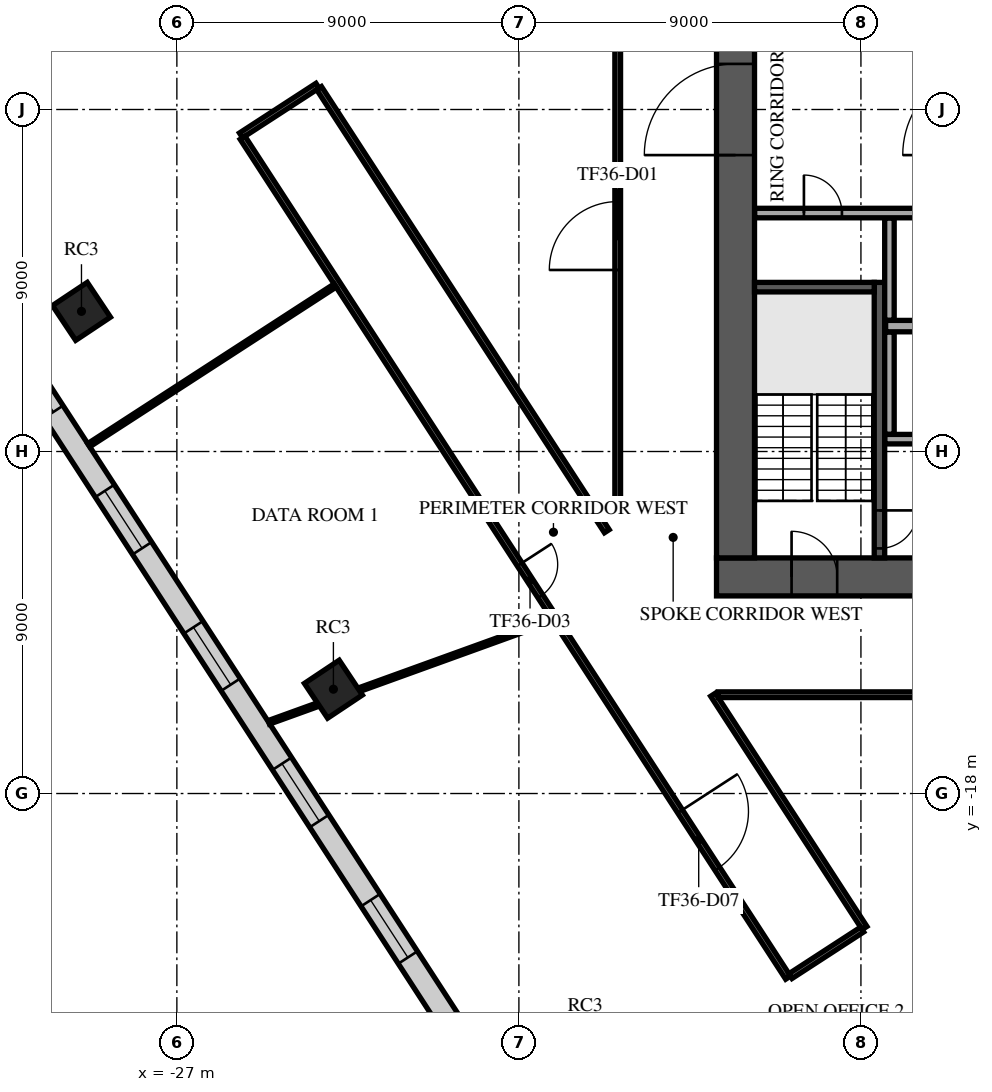
"""IFC4 building model, lengths in metres.
Left out: names, types, materials, properties, quantities, classifications, styles, units other than length and angle.
Written with IfcOpenShell. Run it as: python <this file> out.ifc"""

import sys

from ifc_helpers import new_model, si_unit, direction, frame, frame_2d, origin, origin_2d, place, context, subcontext, project, spatial, rectangle, extrude, element, fill, save


model = new_model("IFC4")
c1 = context("Model", 3, precision=1e-05, world=origin(), true_north=direction((0.0, 1.0)))
c2 = subcontext(c1, "Body", "Model", "MODEL_VIEW")
j1 = project(units=[si_unit("LENGTHUNIT", "METRE"), si_unit("PLANEANGLEUNIT", "RADIAN")], contexts=[c1])
p1 = place(None, origin())
s1 = spatial("IfcSite", under=j1, at=p1, CompositionType="ELEMENT")
p2 = place(p1, origin())
s2 = spatial("IfcBuilding", under=s1, at=p2, CompositionType="ELEMENT")
p3 = place(p2, frame((0.0, 0.0, 155.7)))
s3 = spatial("IfcBuildingStorey", under=s2, at=p3, CompositionType="ELEMENT", Elevation=155.7)
for number, where, z_axis, x_axis in (
    (1, (-29.51, -5.312, 0.0), (0.0, 0.0, 1.0), (0.832, 0.555, 0.0)),
    (2, (-22.881, -15.255, 0.0), (0.0, 0.0, 1.0), (0.832, 0.555, 0.0)),
):
    element("IfcColumn", number, at=place(p3, frame(where, z_axis=z_axis, x_axis=x_axis)), inside=s3, PredefinedType="COLUMN", context=c2, shape_type="SweptSolid", body=[
        extrude(rectangle(XDim=1.1, YDim=1.1, at=origin_2d()), origin(), (0.0, 0.0, 1.0), 4.0),
    ])
p4 = place(p3, frame((-12.8, -12.3, 0.0), z_axis=(0.0, 0.0, 1.0), x_axis=(1.0, 0.0, 0.0)))
e3 = element("IfcWall", 3, at=p4, inside=s3, PredefinedType="SHEAR", context=c2, shape_type="SweptSolid", body=[
    extrude(rectangle(XDim=25.6, YDim=1.0, at=frame_2d((12.8, 0.0))), origin(), (0.0, 0.0, 1.0), 3.6),
])
p5 = place(p4, frame((7.7, 0.0, 0.0)))
e4 = element("IfcOpeningElement", 4, at=p5, cuts=e3, PredefinedType="OPENING", context=c2, shape_type="SweptSolid", body=[
    extrude(rectangle(XDim=2.0, YDim=2.1, at=frame_2d((1.0, 1.05))), frame((0.0, 0.51, 0.0), z_axis=(0.0, -1.0, 0.0), x_axis=(1.0, 0.0, 0.0)), (0.0, 0.0, 1.0), 1.02),
])
p6 = place(p4, frame((17.825, 0.0, 0.0)))
e5 = element("IfcOpeningElement", 5, at=p6, cuts=e3, PredefinedType="OPENING", context=c2, shape_type="SweptSolid", body=[
    extrude(rectangle(XDim=1.2, YDim=2.1, at=frame_2d((0.6, 1.05))), frame((0.0, 0.51, 0.0), z_axis=(0.0, -1.0, 0.0), x_axis=(1.0, 0.0, 0.0)), (0.0, 0.0, 1.0), 1.02),
])
p7 = place(p4, frame((1.975, 0.0, 0.0)))
e6 = element("IfcOpeningElement", 6, at=p7, cuts=e3, PredefinedType="OPENING", context=c2, shape_type="SweptSolid", body=[
    extrude(rectangle(XDim=1.2, YDim=2.1, at=frame_2d((0.6, 1.05))), frame((0.0, 0.51, 0.0), z_axis=(0.0, -1.0, 0.0), x_axis=(1.0, 0.0, 0.0)), (0.0, 0.0, 1.0), 1.02),
])
p8 = place(p4, frame((22.425, 0.0, 0.0)))
e7 = element("IfcOpeningElement", 7, at=p8, cuts=e3, PredefinedType="OPENING", context=c2, shape_type="SweptSolid", body=[
    extrude(rectangle(XDim=1.2, YDim=2.1, at=frame_2d((0.6, 1.05))), frame((0.0, 0.51, 0.0), z_axis=(0.0, -1.0, 0.0), x_axis=(1.0, 0.0, 0.0)), (0.0, 0.0, 1.0), 1.02),
])
p9 = place(p3, frame((-12.3, -11.8, 0.0), z_axis=(0.0, 0.0, 1.0), x_axis=(0.0, 1.0, 0.0)))
e8 = element("IfcWall", 8, at=p9, inside=s3, PredefinedType="SHEAR", context=c2, shape_type="SweptSolid", body=[
    extrude(rectangle(XDim=23.6, YDim=1.0, at=frame_2d((11.8, 0.0))), origin(), (0.0, 0.0, 1.0), 3.6),
])
p10 = place(p9, frame((10.6, 0.0, 0.0)))
e9 = element("IfcOpeningElement", 9, at=p10, cuts=e8, PredefinedType="OPENING", context=c2, shape_type="SweptSolid", body=[
    extrude(rectangle(XDim=2.4, YDim=2.4, at=frame_2d((1.2, 1.2))), frame((0.0, 0.51, 0.0), z_axis=(0.0, -1.0, 0.0), x_axis=(1.0, 0.0, 0.0)), (0.0, 0.0, 1.0), 1.02),
])
p11 = place(p3, frame((-8.512, -4.55, 0.0), z_axis=(0.0, 0.0, 1.0), x_axis=(0.0, -1.0, 0.0)))
e10 = element("IfcWall", 10, at=p11, inside=s3, PredefinedType="SOLIDWALL", context=c2, shape_type="SweptSolid", body=[
    extrude(rectangle(XDim=7.25, YDim=0.275, at=frame_2d((3.625, 0.0))), origin(), (0.0, 0.0, 1.0), 3.6),
])
p12 = place(p11, frame((6.0, 0.0, 0.0)))
e11 = element("IfcOpeningElement", 11, at=p12, cuts=e10, PredefinedType="OPENING", context=c2, shape_type="SweptSolid", body=[
    extrude(rectangle(XDim=1.0, YDim=2.1, at=frame_2d((0.5, 1.05))), frame((0.0, 0.147, 0.0), z_axis=(0.0, -1.0, 0.0), x_axis=(1.0, 0.0, 0.0)), (0.0, 0.0, 1.0), 0.295),
])
p13 = place(p3, frame((-8.65, -4.675, 0.0), z_axis=(0.0, 0.0, 1.0), x_axis=(-1.0, 0.0, 0.0)))
e12 = element("IfcWall", 12, at=p13, inside=s3, PredefinedType="SOLIDWALL", context=c2, shape_type="SweptSolid", body=[
    extrude(rectangle(XDim=3.15, YDim=0.25, at=frame_2d((1.575, 0.0))), origin(), (0.0, 0.0, 1.0), 3.6),
])
p14 = place(p3, frame((-8.37, -8.675, 0.0), z_axis=(0.0, 0.0, 1.0), x_axis=(1.0, 0.0, 0.0)))
e13 = element("IfcWall", 13, at=p14, inside=s3, PredefinedType="PARTITIONING", context=c2, shape_type="SweptSolid", body=[
    extrude(rectangle(XDim=5.49, YDim=0.25, at=frame_2d((2.745, 0.0))), origin(), (0.0, 0.0, 1.0), 3.6),
])
p15 = place(p14, frame((0.995, 0.0, 0.0)))
e14 = element("IfcOpeningElement", 14, at=p15, cuts=e13, PredefinedType="OPENING", context=c2, shape_type="SweptSolid", body=[
    extrude(rectangle(XDim=1.0, YDim=2.1, at=frame_2d((0.5, 1.05))), frame((0.0, 0.135, 0.0), z_axis=(0.0, -1.0, 0.0), x_axis=(1.0, 0.0, 0.0)), (0.0, 0.0, 1.0), 0.27),
])
p16 = place(p14, frame((3.745, 0.0, 0.0)))
e15 = element("IfcOpeningElement", 15, at=p16, cuts=e13, PredefinedType="OPENING", context=c2, shape_type="SweptSolid", body=[
    extrude(rectangle(XDim=1.0, YDim=2.1, at=frame_2d((0.5, 1.05))), frame((0.0, 0.135, 0.0), z_axis=(0.0, -1.0, 0.0), x_axis=(1.0, 0.0, 0.0)), (0.0, 0.0, 1.0), 0.27),
])
p17 = place(p3, frame((-8.25, -8.545, 0.0), z_axis=(0.0, 0.0, 1.0), x_axis=(0.0, 1.0, 0.0)))
e16 = element("IfcWall", 16, at=p17, inside=s3, PredefinedType="PARTITIONING", context=c2, shape_type="SweptSolid", body=[
    extrude(rectangle(XDim=2.69, YDim=0.25, at=frame_2d((1.345, 0.0))), origin(), (0.0, 0.0, 1.0), 3.6),
])
p18 = place(p3, frame((-8.35, -5.7, 0.0), z_axis=(0.0, 0.0, 1.0), x_axis=(1.0, 0.0, 0.0)))
e17 = element("IfcWall", 17, at=p18, inside=s3, PredefinedType="PARTITIONING", context=c2, shape_type="SweptSolid", body=[
    extrude(rectangle(XDim=5.47, YDim=0.3, at=frame_2d((2.735, 0.0))), origin(), (0.0, 0.0, 1.0), 3.6),
])
p19 = place(p3, frame((-8.25, -5.545, 0.0), z_axis=(0.0, 0.0, 1.0), x_axis=(0.0, 1.0, 0.0)))
e18 = element("IfcWall", 18, at=p19, inside=s3, PredefinedType="PARTITIONING", context=c2, shape_type="SweptSolid", body=[
    extrude(rectangle(XDim=2.69, YDim=0.25, at=frame_2d((1.345, 0.0))), origin(), (0.0, 0.0, 1.0), 3.6),
])
p20 = place(p3, frame((-11.795, -2.725, 0.0), z_axis=(0.0, 0.0, 1.0), x_axis=(1.0, 0.0, 0.0)))
e19 = element("IfcWall", 19, at=p20, inside=s3, PredefinedType="PARTITIONING", context=c2, shape_type="SweptSolid", body=[
    extrude(rectangle(XDim=8.915, YDim=0.25, at=frame_2d((4.458, 0.0))), origin(), (0.0, 0.0, 1.0), 3.6),
])
p21 = place(p20, frame((1.295, 0.0, 0.0)))
e20 = element("IfcOpeningElement", 20, at=p21, cuts=e19, PredefinedType="OPENING", context=c2, shape_type="SweptSolid", body=[
    extrude(rectangle(XDim=1.0, YDim=2.1, at=frame_2d((0.5, 1.05))), frame((0.0, 0.135, 0.0), z_axis=(0.0, -1.0, 0.0), x_axis=(1.0, 0.0, 0.0)), (0.0, 0.0, 1.0), 0.27),
])
p22 = place(p20, frame((4.42, 0.0, 0.0)))
e21 = element("IfcOpeningElement", 21, at=p22, cuts=e19, PredefinedType="OPENING", context=c2, shape_type="SweptSolid", body=[
    extrude(rectangle(XDim=1.0, YDim=2.1, at=frame_2d((0.5, 1.05))), frame((0.0, 0.135, 0.0), z_axis=(0.0, -1.0, 0.0), x_axis=(1.0, 0.0, 0.0)), (0.0, 0.0, 1.0), 0.27),
])
p23 = place(p3, frame((-36.496, 1.667, 0.0), z_axis=(0.0, 0.0, 1.0), x_axis=(0.544642236407, -0.838668488929, 0.0)))
e22 = element("IfcWall", 22, at=p23, inside=s3, PredefinedType="STANDARD", context=c2, shape_type="SweptSolid", body=[
    extrude(rectangle(XDim=42.552, YDim=0.6, at=frame_2d((21.276, 0.0))), origin(), (0.0, 0.0, 1.0), 3.6),
])
p24 = place(p23, frame((1.178, 0.0, 0.9)))
e23 = element("IfcOpeningElement", 23, at=p24, cuts=e22, PredefinedType="OPENING", context=c2, shape_type="SweptSolid", body=[
    extrude(rectangle(XDim=1.8, YDim=2.1, at=frame_2d((0.9, 1.05))), frame((0.0, 0.31, 0.0), z_axis=(0.0, -1.0, 0.0), x_axis=(1.0, 0.0, 0.0)), (0.0, 0.0, 1.0), 0.62),
])
p25 = place(p23, frame((5.396, 0.0, 0.9)))
e24 = element("IfcOpeningElement", 24, at=p25, cuts=e22, PredefinedType="OPENING", context=c2, shape_type="SweptSolid", body=[
    extrude(rectangle(XDim=1.8, YDim=2.1, at=frame_2d((0.9, 1.05))), frame((0.0, 0.31, 0.0), z_axis=(0.0, -1.0, 0.0), x_axis=(1.0, 0.0, 0.0)), (0.0, 0.0, 1.0), 0.62),
])
p26 = place(p23, frame((9.676, 0.0, 0.9)))
e25 = element("IfcOpeningElement", 25, at=p26, cuts=e22, PredefinedType="OPENING", context=c2, shape_type="SweptSolid", body=[
    extrude(rectangle(XDim=1.8, YDim=2.1, at=frame_2d((0.9, 1.05))), frame((0.0, 0.31, 0.0), z_axis=(0.0, -1.0, 0.0), x_axis=(1.0, 0.0, 0.0)), (0.0, 0.0, 1.0), 0.62),
])
p27 = place(p23, frame((13.956, 0.0, 0.9)))
e26 = element("IfcOpeningElement", 26, at=p27, cuts=e22, PredefinedType="OPENING", context=c2, shape_type="SweptSolid", body=[
    extrude(rectangle(XDim=1.8, YDim=2.1, at=frame_2d((0.9, 1.05))), frame((0.0, 0.31, 0.0), z_axis=(0.0, -1.0, 0.0), x_axis=(1.0, 0.0, 0.0)), (0.0, 0.0, 1.0), 0.62),
])
p28 = place(p23, frame((18.236, 0.0, 0.9)))
e27 = element("IfcOpeningElement", 27, at=p28, cuts=e22, PredefinedType="OPENING", context=c2, shape_type="SweptSolid", body=[
    extrude(rectangle(XDim=1.8, YDim=2.1, at=frame_2d((0.9, 1.05))), frame((0.0, 0.31, 0.0), z_axis=(0.0, -1.0, 0.0), x_axis=(1.0, 0.0, 0.0)), (0.0, 0.0, 1.0), 0.62),
])
p29 = place(p23, frame((22.516, 0.0, 0.9)))
e28 = element("IfcOpeningElement", 28, at=p29, cuts=e22, PredefinedType="OPENING", context=c2, shape_type="SweptSolid", body=[
    extrude(rectangle(XDim=1.8, YDim=2.1, at=frame_2d((0.9, 1.05))), frame((0.0, 0.31, 0.0), z_axis=(0.0, -1.0, 0.0), x_axis=(1.0, 0.0, 0.0)), (0.0, 0.0, 1.0), 0.62),
])
p30 = place(p23, frame((26.796, 0.0, 0.9)))
e29 = element("IfcOpeningElement", 29, at=p30, cuts=e22, PredefinedType="OPENING", context=c2, shape_type="SweptSolid", body=[
    extrude(rectangle(XDim=1.8, YDim=2.1, at=frame_2d((0.9, 1.05))), frame((0.0, 0.31, 0.0), z_axis=(0.0, -1.0, 0.0), x_axis=(1.0, 0.0, 0.0)), (0.0, 0.0, 1.0), 0.62),
])
p31 = place(p23, frame((31.076, 0.0, 0.9)))
e30 = element("IfcOpeningElement", 30, at=p31, cuts=e22, PredefinedType="OPENING", context=c2, shape_type="SweptSolid", body=[
    extrude(rectangle(XDim=1.8, YDim=2.1, at=frame_2d((0.9, 1.05))), frame((0.0, 0.31, 0.0), z_axis=(0.0, -1.0, 0.0), x_axis=(1.0, 0.0, 0.0)), (0.0, 0.0, 1.0), 0.62),
])
p32 = place(p23, frame((35.356, 0.0, 0.9)))
e31 = element("IfcOpeningElement", 31, at=p32, cuts=e22, PredefinedType="OPENING", context=c2, shape_type="SweptSolid", body=[
    extrude(rectangle(XDim=1.8, YDim=2.1, at=frame_2d((0.9, 1.05))), frame((0.0, 0.31, 0.0), z_axis=(0.0, -1.0, 0.0), x_axis=(1.0, 0.0, 0.0)), (0.0, 0.0, 1.0), 0.62),
])
p33 = place(p23, frame((39.573, 0.0, 0.9)))
e32 = element("IfcOpeningElement", 32, at=p33, cuts=e22, PredefinedType="OPENING", context=c2, shape_type="SweptSolid", body=[
    extrude(rectangle(XDim=1.8, YDim=2.1, at=frame_2d((0.9, 1.05))), frame((0.0, 0.31, 0.0), z_axis=(0.0, -1.0, 0.0), x_axis=(1.0, 0.0, 0.0)), (0.0, 0.0, 1.0), 0.62),
])
p34 = place(p3, frame((-25.312, -0.681, 0.0), z_axis=(0.0, 0.0, 1.0), x_axis=(0.838734016275, 0.544541320694, 0.0)))
e33 = element("IfcWall", 33, at=p34, inside=s3, PredefinedType="PARTITIONING", context=c2, shape_type="SweptSolid", body=[
    extrude(rectangle(XDim=2.4, YDim=0.15, at=frame_2d((1.2, 0.0))), origin(), (0.0, 0.0, 1.0), 3.15),
])
p35 = place(p3, frame((-25.271, -0.744, 0.0), z_axis=(0.0, 0.0, 1.0), x_axis=(0.544659433471, -0.838657320681, 0.0)))
e34 = element("IfcWall", 34, at=p35, inside=s3, PredefinedType="PARTITIONING", context=c2, shape_type="SweptSolid", body=[
    extrude(rectangle(XDim=26.354, YDim=0.15, at=frame_2d((13.177, 0.0))), origin(), (0.0, 0.0, 1.0), 3.15),
])
p36 = place(p35, frame((13.388, 0.0, 0.0)))
e35 = element("IfcOpeningElement", 35, at=p36, cuts=e34, PredefinedType="OPENING", context=c2, shape_type="SweptSolid", body=[
    extrude(rectangle(XDim=1.0, YDim=2.1, at=frame_2d((0.5, 1.05))), frame((0.0, 0.085, 0.0), z_axis=(0.0, -1.0, 0.0), x_axis=(1.0, 0.0, 0.0)), (0.0, 0.0, 1.0), 0.17),
])
p37 = place(p35, frame((21.137, 0.0, 0.0)))
e36 = element("IfcOpeningElement", 36, at=p37, cuts=e34, PredefinedType="OPENING", context=c2, shape_type="SweptSolid", body=[
    extrude(rectangle(XDim=1.8, YDim=2.1, at=frame_2d((0.9, 1.05))), frame((0.0, 0.085, 0.0), z_axis=(0.0, -1.0, 0.0), x_axis=(1.0, 0.0, 0.0)), (0.0, 0.0, 1.0), 0.17),
])
p38 = place(p3, frame((-23.258, 0.563, 0.0), z_axis=(0.0, 0.0, 1.0), x_axis=(0.544638327972, -0.838671027104, 0.0)))
e37 = element("IfcWall", 37, at=p38, inside=s3, PredefinedType="PARTITIONING", context=c2, shape_type="SweptSolid", body=[
    extrude(rectangle(XDim=13.903, YDim=0.15, at=frame_2d((6.951, 0.0))), origin(), (0.0, 0.0, 1.0), 3.15),
])
p39 = place(p3, frame((-15.4, -10.773, 0.0), z_axis=(0.0, 0.0, 1.0), x_axis=(0.0, 1.0, 0.0)))
e38 = element("IfcWall", 38, at=p39, inside=s3, PredefinedType="PARTITIONING", context=c2, shape_type="SweptSolid", body=[
    extrude(rectangle(XDim=20.426, YDim=0.15, at=frame_2d((10.213, 0.0))), origin(), (0.0, 0.0, 1.0), 3.15),
])
p40 = place(p39, frame((6.55, 0.0, 0.0)))
e39 = element("IfcOpeningElement", 39, at=p40, cuts=e38, PredefinedType="OPENING", context=c2, shape_type="SweptSolid", body=[
    extrude(rectangle(XDim=1.8, YDim=2.1, at=frame_2d((0.9, 1.05))), frame((0.0, 0.085, 0.0), z_axis=(0.0, -1.0, 0.0), x_axis=(1.0, 0.0, 0.0)), (0.0, 0.0, 1.0), 0.17),
])
p41 = place(p39, frame((15.746, 0.0, 0.0)))
e40 = element("IfcOpeningElement", 40, at=p41, cuts=e38, PredefinedType="OPENING", context=c2, shape_type="SweptSolid", body=[
    extrude(rectangle(XDim=1.0, YDim=2.1, at=frame_2d((0.5, 1.05))), frame((0.0, 0.085, 0.0), z_axis=(0.0, -1.0, 0.0), x_axis=(1.0, 0.0, 0.0)), (0.0, 0.0, 1.0), 0.17),
])
p42 = place(p3, frame((-12.891, -15.4, 0.0), z_axis=(0.0, 0.0, 1.0), x_axis=(0.544568574612, -0.838716321258, 0.0)))
e41 = element("IfcWall", 41, at=p42, inside=s3, PredefinedType="PARTITIONING", context=c2, shape_type="SweptSolid", body=[
    extrude(rectangle(XDim=7.32, YDim=0.15, at=frame_2d((3.66, 0.0))), origin(), (0.0, 0.0, 1.0), 3.15),
])
p43 = place(p3, frame((-12.753, -15.4, 0.0), z_axis=(0.0, 0.0, 1.0), x_axis=(1.0, 0.0, 0.0)))
e42 = element("IfcWall", 42, at=p43, inside=s3, PredefinedType="PARTITIONING", context=c2, shape_type="SweptSolid", body=[
    extrude(rectangle(XDim=18.982, YDim=0.15, at=frame_2d((9.491, 0.0))), origin(), (0.0, 0.0, 1.0), 3.15),
])
p44 = place(p43, frame((11.275, 0.0, 0.0)))
e43 = element("IfcOpeningElement", 43, at=p44, cuts=e42, PredefinedType="OPENING", context=c2, shape_type="SweptSolid", body=[
    extrude(rectangle(XDim=1.0, YDim=2.1, at=frame_2d((0.5, 1.05))), frame((0.0, 0.085, 0.0), z_axis=(0.0, -1.0, 0.0), x_axis=(1.0, 0.0, 0.0)), (0.0, 0.0, 1.0), 0.17),
])
p45 = place(p3, frame((-10.854, -22.805, 0.0), z_axis=(0.0, 0.0, 1.0), x_axis=(0.838555201952, 0.544816641889, 0.0)))
e44 = element("IfcWall", 44, at=p45, inside=s3, PredefinedType="PARTITIONING", context=c2, shape_type="SweptSolid", body=[
    extrude(rectangle(XDim=2.249, YDim=0.15, at=frame_2d((1.125, 0.0))), origin(), (0.0, 0.0, 1.0), 3.6),
])
p46 = place(p3, frame((-29.317, -8.833, 0.0), z_axis=(0.0, 0.0, 1.0), x_axis=(0.839172220575, 0.543865777757, 0.0)))
e45 = element("IfcWall", 45, at=p46, inside=s3, PredefinedType="PARTITIONING", context=c2, shape_type="SweptSolid", body=[
    extrude(rectangle(XDim=7.724, YDim=0.1, at=frame_2d((3.862, 0.0))), origin(), (0.0, 0.0, 1.0), 2.9),
])
p47 = place(p3, frame((-24.58, -16.127, 0.0), z_axis=(0.0, 0.0, 1.0), x_axis=(0.94044924629, 0.339934133551, 0.0)))
e46 = element("IfcWall", 46, at=p47, inside=s3, PredefinedType="PARTITIONING", context=c2, shape_type="SweptSolid", body=[
    extrude(rectangle(XDim=1.387, YDim=0.1, at=frame_2d((0.694, 0.0))), origin(), (0.0, 0.0, 1.0), 3.6),
])
p48 = place(p3, frame((-22.21, -15.27, 0.0), z_axis=(0.0, 0.0, 1.0), x_axis=(0.940414992248, 0.34002888459, 0.0)))
e47 = element("IfcWall", 47, at=p48, inside=s3, PredefinedType="PARTITIONING", context=c2, shape_type="SweptSolid", body=[
    extrude(rectangle(XDim=5.399, YDim=0.1, at=frame_2d((2.7, 0.0))), origin(), (0.0, 0.0, 1.0), 3.03),
])
p49 = place(p7, origin())
e48 = element("IfcDoor", 48, at=p49, inside=s3, OperationType="SINGLE_SWING_LEFT", PredefinedType="DOOR", context=c2, shape_type="SweptSolid", body=[
    extrude(rectangle(XDim=1.2, YDim=2.1, at=frame_2d((0.6, 1.05))), frame((0.0, 0.025, 0.0), z_axis=(0.0, -1.0, 0.0), x_axis=(1.0, 0.0, 0.0)), (0.0, 0.0, 1.0), 0.05),
])
fill(e6, e48)
p50 = place(p10, origin())
e49 = element("IfcDoor", 49, at=p50, inside=s3, OperationType="SINGLE_SWING_LEFT", PredefinedType="DOOR", context=c2, shape_type="SweptSolid", body=[
    extrude(rectangle(XDim=2.4, YDim=2.4, at=frame_2d((1.2, 1.2))), frame((0.0, 0.025, 0.0), z_axis=(0.0, -1.0, 0.0), x_axis=(1.0, 0.0, 0.0)), (0.0, 0.0, 1.0), 0.05),
])
fill(e9, e49)
p51 = place(p12, origin())
e50 = element("IfcDoor", 50, at=p51, inside=s3, OperationType="SINGLE_SWING_LEFT", PredefinedType="DOOR", context=c2, shape_type="SweptSolid", body=[
    extrude(rectangle(XDim=1.0, YDim=2.1, at=frame_2d((0.5, 1.05))), frame((0.0, 0.025, 0.0), z_axis=(0.0, -1.0, 0.0), x_axis=(1.0, 0.0, 0.0)), (0.0, 0.0, 1.0), 0.05),
])
fill(e11, e50)
p52 = place(p21, origin())
e51 = element("IfcDoor", 51, at=p52, inside=s3, OperationType="SINGLE_SWING_LEFT", PredefinedType="DOOR", context=c2, shape_type="SweptSolid", body=[
    extrude(rectangle(XDim=1.0, YDim=2.1, at=frame_2d((0.5, 1.05))), frame((0.0, 0.025, 0.0), z_axis=(0.0, -1.0, 0.0), x_axis=(1.0, 0.0, 0.0)), (0.0, 0.0, 1.0), 0.05),
])
fill(e20, e51)
p53 = place(p26, origin())
e52 = element("IfcWindow", 52, at=p53, inside=s3, PartitioningType="SINGLE_PANEL", PredefinedType="WINDOW", context=c2, shape_type="SweptSolid", body=[
    extrude(rectangle(XDim=1.8, YDim=2.1, at=frame_2d((0.9, 1.05))), frame((0.0, 0.03, 0.0), z_axis=(0.0, -1.0, 0.0), x_axis=(1.0, 0.0, 0.0)), (0.0, 0.0, 1.0), 0.06),
])
fill(e25, e52)
p54 = place(p27, origin())
e53 = element("IfcWindow", 53, at=p54, inside=s3, PartitioningType="SINGLE_PANEL", PredefinedType="WINDOW", context=c2, shape_type="SweptSolid", body=[
    extrude(rectangle(XDim=1.8, YDim=2.1, at=frame_2d((0.9, 1.05))), frame((0.0, 0.03, 0.0), z_axis=(0.0, -1.0, 0.0), x_axis=(1.0, 0.0, 0.0)), (0.0, 0.0, 1.0), 0.06),
])
fill(e26, e53)
p55 = place(p28, origin())
e54 = element("IfcWindow", 54, at=p55, inside=s3, PartitioningType="SINGLE_PANEL", PredefinedType="WINDOW", context=c2, shape_type="SweptSolid", body=[
    extrude(rectangle(XDim=1.8, YDim=2.1, at=frame_2d((0.9, 1.05))), frame((0.0, 0.03, 0.0), z_axis=(0.0, -1.0, 0.0), x_axis=(1.0, 0.0, 0.0)), (0.0, 0.0, 1.0), 0.06),
])
fill(e27, e54)
p56 = place(p29, origin())
e55 = element("IfcWindow", 55, at=p56, inside=s3, PartitioningType="SINGLE_PANEL", PredefinedType="WINDOW", context=c2, shape_type="SweptSolid", body=[
    extrude(rectangle(XDim=1.8, YDim=2.1, at=frame_2d((0.9, 1.05))), frame((0.0, 0.03, 0.0), z_axis=(0.0, -1.0, 0.0), x_axis=(1.0, 0.0, 0.0)), (0.0, 0.0, 1.0), 0.06),
])
fill(e28, e55)
p57 = place(p30, origin())
e56 = element("IfcWindow", 56, at=p57, inside=s3, PartitioningType="SINGLE_PANEL", PredefinedType="WINDOW", context=c2, shape_type="SweptSolid", body=[
    extrude(rectangle(XDim=1.8, YDim=2.1, at=frame_2d((0.9, 1.05))), frame((0.0, 0.03, 0.0), z_axis=(0.0, -1.0, 0.0), x_axis=(1.0, 0.0, 0.0)), (0.0, 0.0, 1.0), 0.06),
])
fill(e29, e56)
p58 = place(p40, origin())
e57 = element("IfcDoor", 57, at=p58, inside=s3, OperationType="DOUBLE_DOOR_SINGLE_SWING", PredefinedType="DOOR", context=c2, shape_type="SweptSolid", body=[
    extrude(rectangle(XDim=1.8, YDim=2.1, at=frame_2d((0.9, 1.05))), frame((0.0, 0.025, 0.0), z_axis=(0.0, -1.0, 0.0), x_axis=(1.0, 0.0, 0.0)), (0.0, 0.0, 1.0), 0.05),
])
fill(e39, e57)
p59 = place(p36, frame((1.0, 0.0, 0.0), z_axis=(0.0, 0.0, 1.0), x_axis=(-1.0, 0.0, 0.0)))
e58 = element("IfcDoor", 58, at=p59, inside=s3, OperationType="SINGLE_SWING_LEFT", PredefinedType="DOOR", context=c2, shape_type="SweptSolid", body=[
    extrude(rectangle(XDim=1.0, YDim=2.1, at=frame_2d((0.5, 1.05))), frame((0.0, 0.025, 0.0), z_axis=(0.0, -1.0, 0.0), x_axis=(1.0, 0.0, 0.0)), (0.0, 0.0, 1.0), 0.05),
])
fill(e35, e58)
p60 = place(p37, frame((1.8, 0.0, 0.0), z_axis=(0.0, 0.0, 1.0), x_axis=(-1.0, 0.0, 0.0)))
e59 = element("IfcDoor", 59, at=p60, inside=s3, OperationType="DOUBLE_DOOR_SINGLE_SWING", PredefinedType="DOOR", context=c2, shape_type="SweptSolid", body=[
    extrude(rectangle(XDim=1.8, YDim=2.1, at=frame_2d((0.9, 1.05))), frame((0.0, 0.025, 0.0), z_axis=(0.0, -1.0, 0.0), x_axis=(1.0, 0.0, 0.0)), (0.0, 0.0, 1.0), 0.05),
])
fill(e36, e59)
save(model, sys.argv[1])
